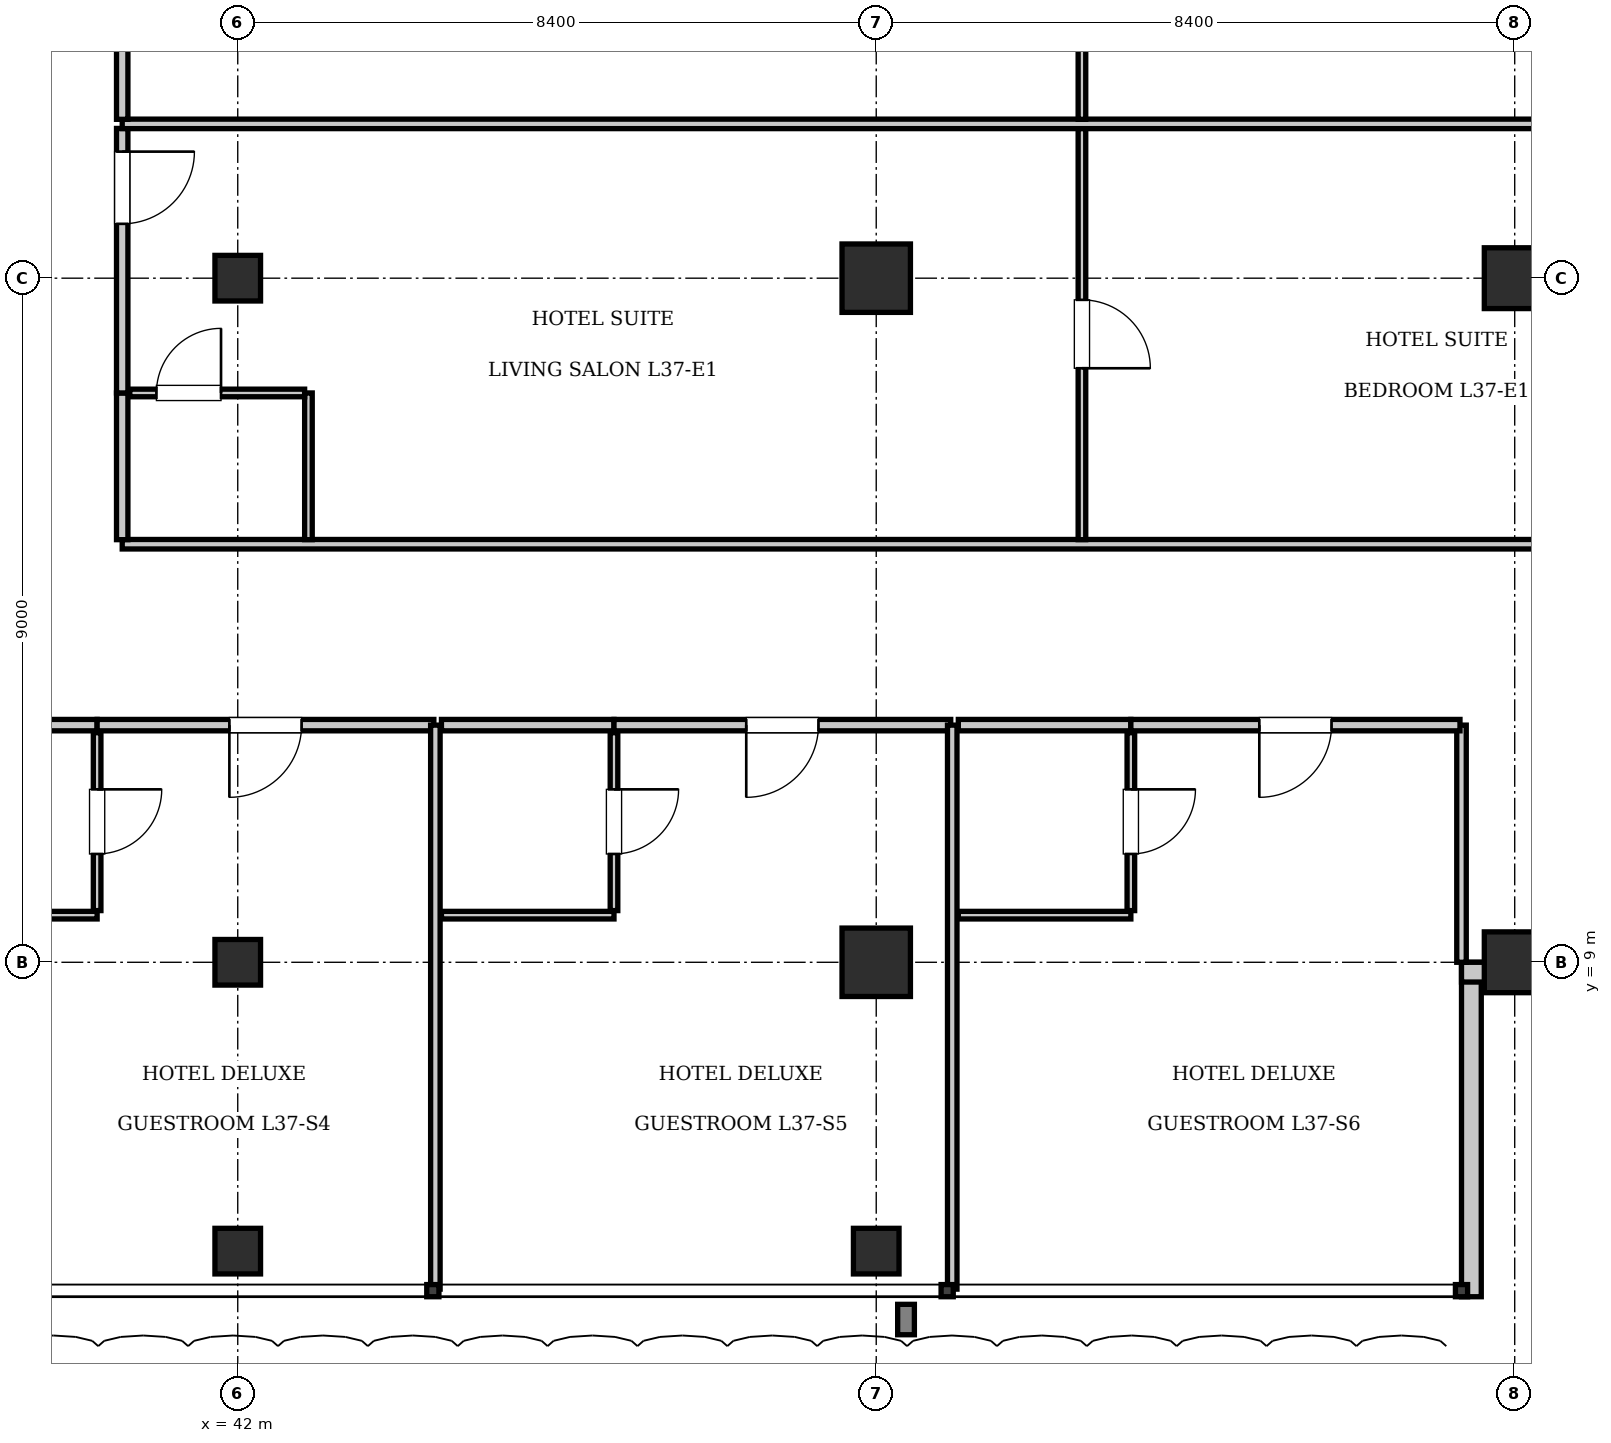
"""IFC4 building model, lengths in metres.
Left out: names, types, materials, properties, quantities, classifications, styles, units other than length and angle.
Written with IfcOpenShell. Run it as: python <this file> out.ifc"""

import sys

from ifc_helpers import new_model, si_unit, direction, frame, frame_2d, origin, origin_2d, place, context, subcontext, project, spatial, rectangle, i_section, extrude, element, fill, save


model = new_model("IFC4")
c1 = context("Model", 3, precision=1e-05, world=origin(), true_north=direction((0.0, 1.0)))
c2 = subcontext(c1, "Body", "Model", "MODEL_VIEW")
j1 = project(units=[si_unit("LENGTHUNIT", "METRE"), si_unit("PLANEANGLEUNIT", "RADIAN")], contexts=[c1])
p1 = place(None, origin())
s1 = spatial("IfcSite", under=j1, at=p1, CompositionType="ELEMENT")
p2 = place(p1, origin())
s2 = spatial("IfcBuilding", under=s1, at=p2, CompositionType="ELEMENT")
p3 = place(p2, frame((0.0, 0.0, 154.35)))
s3 = spatial("IfcBuildingStorey", under=s2, at=p3, CompositionType="ELEMENT", Elevation=154.35)
for number, where, z_axis, x_axis in (
    (1, (50.4, 18.0, 0.0), (0.0, 0.0, 1.0), (1.0, 0.0, 0.0)),
    (2, (50.4, 9.0, 0.0), (0.0, 0.0, 1.0), (1.0, 0.0, 0.0)),
):
    element("IfcColumn", number, at=place(p3, frame(where, z_axis=z_axis, x_axis=x_axis)), inside=s3, PredefinedType="COLUMN", context=c2, shape_type="SweptSolid", body=[
        extrude(rectangle(XDim=0.9, YDim=0.9, at=origin_2d()), origin(), (0.0, 0.0, 1.0), 3.85),
    ])
for number, where, z_axis, x_axis in (
    (3, (42.0, 9.0, 0.0), (0.0, 0.0, 1.0), (1.0, 0.0, 0.0)),
    (4, (42.0, 18.0, 0.0), (0.0, 0.0, 1.0), (1.0, 0.0, 0.0)),
):
    element("IfcColumn", number, at=place(p3, frame(where, z_axis=z_axis, x_axis=x_axis)), inside=s3, PredefinedType="COLUMN", context=c2, shape_type="SweptSolid", body=[
        extrude(i_section(OverallWidth=0.6, OverallDepth=0.6, WebThickness=0.025, FlangeThickness=0.038, at=origin_2d()), origin(), (0.0, 0.0, 1.0), 3.85),
    ])
for number, where, z_axis, x_axis in (
    (5, (58.8, 9.0, 0.0), (0.0, 0.0, 1.0), (1.0, 0.0, 0.0)),
    (6, (58.8, 18.0, 0.0), (0.0, 0.0, 1.0), (1.0, 0.0, 0.0)),
):
    element("IfcColumn", number, at=place(p3, frame(where, z_axis=z_axis, x_axis=x_axis)), inside=s3, PredefinedType="COLUMN", context=c2, shape_type="SweptSolid", body=[
        extrude(rectangle(XDim=0.8, YDim=0.8, at=origin_2d()), origin(), (0.0, 0.0, 1.0), 3.85),
    ])
for number, where, z_axis, x_axis in (
    (7, (42.0, 5.2, 0.0), (0.0, 0.0, 1.0), (1.0, 0.0, 0.0)),
    (8, (50.4, 5.2, 0.0), (0.0, 0.0, 1.0), (1.0, 0.0, 0.0)),
):
    element("IfcColumn", number, at=place(p3, frame(where, z_axis=z_axis, x_axis=x_axis)), inside=s3, PredefinedType="COLUMN", context=c2, shape_type="SweptSolid", body=[
        extrude(i_section(OverallWidth=0.6, OverallDepth=0.6, WebThickness=0.025, FlangeThickness=0.038, at=origin_2d()), origin(), (0.0, 0.0, 1.0), 3.85),
    ])
p4 = place(p3, frame((58.23, 9.0, 0.0), z_axis=(0.0, 0.0, 1.0), x_axis=(0.0, -1.0, 0.0)))
e9 = element("IfcWall", 9, at=p4, inside=s3, PredefinedType="SOLIDWALL", context=c2, shape_type="SweptSolid", body=[
    extrude(rectangle(XDim=4.4, YDim=0.26, at=frame_2d((2.2, 0.0))), origin(), (0.0, 0.0, 1.0), 3.61),
])
p5 = place(p3, frame((62.5, 8.87, 0.0), z_axis=(0.0, 0.0, 1.0), x_axis=(-1.0, 0.0, 0.0)))
e10 = element("IfcWall", 10, at=p5, inside=s3, PredefinedType="SOLIDWALL", context=c2, shape_type="SweptSolid", body=[
    extrude(rectangle(XDim=4.4, YDim=0.26, at=frame_2d((2.2, 0.0))), origin(), (0.0, 0.0, 1.0), 3.007),
])
p6 = place(p3, frame((58.1, 9.0, 0.0), z_axis=(0.0, 0.0, 1.0), x_axis=(0.0, 1.0, 0.0)))
e11 = element("IfcWall", 11, at=p6, inside=s3, PredefinedType="PARTITIONING", context=c2, shape_type="SweptSolid", body=[
    extrude(rectangle(XDim=3.12, YDim=0.125, at=frame_2d((1.56, 0.0))), origin(), (0.0, 0.0, 1.0), 3.61),
])
p7 = place(p3, frame((37.88, 12.12, 0.0), z_axis=(0.0, 0.0, 1.0), x_axis=(1.0, 0.0, 0.0)))
e12 = element("IfcWall", 12, at=p7, inside=s3, PredefinedType="PARTITIONING", context=c2, shape_type="SweptSolid", body=[
    extrude(rectangle(XDim=2.27, YDim=0.15, at=frame_2d((1.135, 0.0))), origin(), (0.0, 0.0, 1.0), 3.61),
])
p8 = place(p3, frame((37.88, 9.62, 0.0), z_axis=(0.0, 0.0, 1.0), x_axis=(1.0, 0.0, 0.0)))
e13 = element("IfcWall", 13, at=p8, inside=s3, PredefinedType="PARTITIONING", context=c2, shape_type="SweptSolid", body=[
    extrude(rectangle(XDim=2.27, YDim=0.1, at=frame_2d((1.135, 0.0))), origin(), (0.0, 0.0, 1.0), 3.61),
])
p9 = place(p3, frame((40.15, 9.68, 0.0), z_axis=(0.0, 0.0, 1.0), x_axis=(0.0, 1.0, 0.0)))
e14 = element("IfcWall", 14, at=p9, inside=s3, PredefinedType="PARTITIONING", context=c2, shape_type="SweptSolid", body=[
    extrude(rectangle(XDim=2.34, YDim=0.1, at=frame_2d((1.17, 0.0))), origin(), (0.0, 0.0, 1.0), 3.61),
])
p10 = place(p9, frame((0.745, 0.0, 0.0)))
e15 = element("IfcOpeningElement", 15, at=p10, cuts=e14, PredefinedType="OPENING", context=c2, shape_type="SweptSolid", body=[
    extrude(rectangle(XDim=0.85, YDim=2.1, at=frame_2d((0.425, 1.05))), frame((0.0, 0.06, 0.0), z_axis=(0.0, -1.0, 0.0), x_axis=(1.0, 0.0, 0.0)), (0.0, 0.0, 1.0), 0.12),
])
p11 = place(p3, frame((40.15, 12.12, 0.0), z_axis=(0.0, 0.0, 1.0), x_axis=(1.0, 0.0, 0.0)))
e16 = element("IfcWall", 16, at=p11, inside=s3, PredefinedType="PARTITIONING", context=c2, shape_type="SweptSolid", body=[
    extrude(rectangle(XDim=4.43, YDim=0.15, at=frame_2d((2.215, 0.0))), origin(), (0.0, 0.0, 1.0), 3.61),
])
p12 = place(p11, frame((1.74, 0.0, 0.0)))
e17 = element("IfcOpeningElement", 17, at=p12, cuts=e16, PredefinedType="OPENING", context=c2, shape_type="SweptSolid", body=[
    extrude(rectangle(XDim=0.95, YDim=2.15, at=frame_2d((0.475, 1.075))), frame((0.0, 0.085, 0.0), z_axis=(0.0, -1.0, 0.0), x_axis=(1.0, 0.0, 0.0)), (0.0, 0.0, 1.0), 0.17),
])
p13 = place(p3, frame((44.6, 4.7, 0.0), z_axis=(0.0, 0.0, 1.0), x_axis=(0.0, 1.0, 0.0)))
e18 = element("IfcWall", 18, at=p13, inside=s3, PredefinedType="PARTITIONING", context=c2, shape_type="SweptSolid", body=[
    extrude(rectangle(XDim=7.42, YDim=0.125, at=frame_2d((3.71, 0.0))), origin(), (0.0, 0.0, 1.0), 3.61),
])
p14 = place(p3, frame((44.68, 12.12, 0.0), z_axis=(0.0, 0.0, 1.0), x_axis=(1.0, 0.0, 0.0)))
e19 = element("IfcWall", 19, at=p14, inside=s3, PredefinedType="PARTITIONING", context=c2, shape_type="SweptSolid", body=[
    extrude(rectangle(XDim=2.27, YDim=0.15, at=frame_2d((1.135, 0.0))), origin(), (0.0, 0.0, 1.0), 3.61),
])
p15 = place(p3, frame((44.68, 9.62, 0.0), z_axis=(0.0, 0.0, 1.0), x_axis=(1.0, 0.0, 0.0)))
e20 = element("IfcWall", 20, at=p15, inside=s3, PredefinedType="PARTITIONING", context=c2, shape_type="SweptSolid", body=[
    extrude(rectangle(XDim=2.27, YDim=0.1, at=frame_2d((1.135, 0.0))), origin(), (0.0, 0.0, 1.0), 3.61),
])
p16 = place(p3, frame((46.95, 9.68, 0.0), z_axis=(0.0, 0.0, 1.0), x_axis=(0.0, 1.0, 0.0)))
e21 = element("IfcWall", 21, at=p16, inside=s3, PredefinedType="PARTITIONING", context=c2, shape_type="SweptSolid", body=[
    extrude(rectangle(XDim=2.34, YDim=0.1, at=frame_2d((1.17, 0.0))), origin(), (0.0, 0.0, 1.0), 3.61),
])
p17 = place(p16, frame((0.745, 0.0, 0.0)))
e22 = element("IfcOpeningElement", 22, at=p17, cuts=e21, PredefinedType="OPENING", context=c2, shape_type="SweptSolid", body=[
    extrude(rectangle(XDim=0.85, YDim=2.1, at=frame_2d((0.425, 1.05))), frame((0.0, 0.06, 0.0), z_axis=(0.0, -1.0, 0.0), x_axis=(1.0, 0.0, 0.0)), (0.0, 0.0, 1.0), 0.12),
])
p18 = place(p3, frame((46.95, 12.12, 0.0), z_axis=(0.0, 0.0, 1.0), x_axis=(1.0, 0.0, 0.0)))
e23 = element("IfcWall", 23, at=p18, inside=s3, PredefinedType="PARTITIONING", context=c2, shape_type="SweptSolid", body=[
    extrude(rectangle(XDim=4.43, YDim=0.15, at=frame_2d((2.215, 0.0))), origin(), (0.0, 0.0, 1.0), 3.61),
])
p19 = place(p18, frame((1.74, 0.0, 0.0)))
e24 = element("IfcOpeningElement", 24, at=p19, cuts=e23, PredefinedType="OPENING", context=c2, shape_type="SweptSolid", body=[
    extrude(rectangle(XDim=0.95, YDim=2.15, at=frame_2d((0.475, 1.075))), frame((0.0, 0.085, 0.0), z_axis=(0.0, -1.0, 0.0), x_axis=(1.0, 0.0, 0.0)), (0.0, 0.0, 1.0), 0.17),
])
p20 = place(p3, frame((51.4, 4.7, 0.0), z_axis=(0.0, 0.0, 1.0), x_axis=(0.0, 1.0, 0.0)))
e25 = element("IfcWall", 25, at=p20, inside=s3, PredefinedType="PARTITIONING", context=c2, shape_type="SweptSolid", body=[
    extrude(rectangle(XDim=7.42, YDim=0.125, at=frame_2d((3.71, 0.0))), origin(), (0.0, 0.0, 1.0), 3.61),
])
p21 = place(p3, frame((51.48, 12.12, 0.0), z_axis=(0.0, 0.0, 1.0), x_axis=(1.0, 0.0, 0.0)))
e26 = element("IfcWall", 26, at=p21, inside=s3, PredefinedType="PARTITIONING", context=c2, shape_type="SweptSolid", body=[
    extrude(rectangle(XDim=2.27, YDim=0.15, at=frame_2d((1.135, 0.0))), origin(), (0.0, 0.0, 1.0), 3.61),
])
p22 = place(p3, frame((51.48, 9.62, 0.0), z_axis=(0.0, 0.0, 1.0), x_axis=(1.0, 0.0, 0.0)))
e27 = element("IfcWall", 27, at=p22, inside=s3, PredefinedType="PARTITIONING", context=c2, shape_type="SweptSolid", body=[
    extrude(rectangle(XDim=2.27, YDim=0.1, at=frame_2d((1.135, 0.0))), origin(), (0.0, 0.0, 1.0), 3.61),
])
p23 = place(p3, frame((53.75, 9.68, 0.0), z_axis=(0.0, 0.0, 1.0), x_axis=(0.0, 1.0, 0.0)))
e28 = element("IfcWall", 28, at=p23, inside=s3, PredefinedType="PARTITIONING", context=c2, shape_type="SweptSolid", body=[
    extrude(rectangle(XDim=2.34, YDim=0.1, at=frame_2d((1.17, 0.0))), origin(), (0.0, 0.0, 1.0), 3.61),
])
p24 = place(p23, frame((0.745, 0.0, 0.0)))
e29 = element("IfcOpeningElement", 29, at=p24, cuts=e28, PredefinedType="OPENING", context=c2, shape_type="SweptSolid", body=[
    extrude(rectangle(XDim=0.85, YDim=2.1, at=frame_2d((0.425, 1.05))), frame((0.0, 0.06, 0.0), z_axis=(0.0, -1.0, 0.0), x_axis=(1.0, 0.0, 0.0)), (0.0, 0.0, 1.0), 0.12),
])
p25 = place(p3, frame((53.75, 12.12, 0.0), z_axis=(0.0, 0.0, 1.0), x_axis=(1.0, 0.0, 0.0)))
e30 = element("IfcWall", 30, at=p25, inside=s3, PredefinedType="PARTITIONING", context=c2, shape_type="SweptSolid", body=[
    extrude(rectangle(XDim=4.33, YDim=0.15, at=frame_2d((2.165, 0.0))), origin(), (0.0, 0.0, 1.0), 3.61),
])
p26 = place(p25, frame((1.69, 0.0, 0.0)))
e31 = element("IfcOpeningElement", 31, at=p26, cuts=e30, PredefinedType="OPENING", context=c2, shape_type="SweptSolid", body=[
    extrude(rectangle(XDim=0.95, YDim=2.15, at=frame_2d((0.475, 1.075))), frame((0.0, 0.085, 0.0), z_axis=(0.0, -1.0, 0.0), x_axis=(1.0, 0.0, 0.0)), (0.0, 0.0, 1.0), 0.17),
])
p27 = place(p3, frame((40.48, 14.5, 0.0), z_axis=(0.0, 0.0, 1.0), x_axis=(1.0, 0.0, 0.0)))
e32 = element("IfcWall", 32, at=p27, inside=s3, PredefinedType="PARTITIONING", context=c2, shape_type="SweptSolid", body=[
    extrude(rectangle(XDim=21.92, YDim=0.125, at=frame_2d((10.96, 0.0))), origin(), (0.0, 0.0, 1.0), 3.61),
])
p28 = place(p3, frame((40.48, 14.56, 0.0), z_axis=(0.0, 0.0, 1.0), x_axis=(0.0, 1.0, 0.0)))
e33 = element("IfcWall", 33, at=p28, inside=s3, PredefinedType="PARTITIONING", context=c2, shape_type="SweptSolid", body=[
    extrude(rectangle(XDim=1.93, YDim=0.15, at=frame_2d((0.965, 0.0))), origin(), (0.0, 0.0, 1.0), 3.61),
])
p29 = place(p3, frame((40.48, 16.49, 0.0), z_axis=(0.0, 0.0, 1.0), x_axis=(0.0, 1.0, 0.0)))
e34 = element("IfcWall", 34, at=p29, inside=s3, PredefinedType="PARTITIONING", context=c2, shape_type="SweptSolid", body=[
    extrude(rectangle(XDim=3.48, YDim=0.15, at=frame_2d((1.74, 0.0))), origin(), (0.0, 0.0, 1.0), 3.61),
])
p30 = place(p29, frame((2.225, 0.0, 0.0)))
e35 = element("IfcOpeningElement", 35, at=p30, cuts=e34, PredefinedType="OPENING", context=c2, shape_type="SweptSolid", body=[
    extrude(rectangle(XDim=0.95, YDim=2.15, at=frame_2d((0.475, 1.075))), frame((0.0, 0.085, 0.0), z_axis=(0.0, -1.0, 0.0), x_axis=(1.0, 0.0, 0.0)), (0.0, 0.0, 1.0), 0.17),
])
p31 = place(p3, frame((42.93, 14.56, 0.0), z_axis=(0.0, 0.0, 1.0), x_axis=(0.0, 1.0, 0.0)))
e36 = element("IfcWall", 36, at=p31, inside=s3, PredefinedType="PARTITIONING", context=c2, shape_type="SweptSolid", body=[
    extrude(rectangle(XDim=1.93, YDim=0.1, at=frame_2d((0.965, 0.0))), origin(), (0.0, 0.0, 1.0), 3.61),
])
p32 = place(p3, frame((40.58, 16.49, 0.0), z_axis=(0.0, 0.0, 1.0), x_axis=(1.0, 0.0, 0.0)))
e37 = element("IfcWall", 37, at=p32, inside=s3, PredefinedType="PARTITIONING", context=c2, shape_type="SweptSolid", body=[
    extrude(rectangle(XDim=2.3, YDim=0.1, at=frame_2d((1.15, 0.0))), origin(), (0.0, 0.0, 1.0), 3.61),
])
p33 = place(p32, frame((0.35, 0.0, 0.0)))
e38 = element("IfcOpeningElement", 38, at=p33, cuts=e37, PredefinedType="OPENING", context=c2, shape_type="SweptSolid", body=[
    extrude(rectangle(XDim=0.85, YDim=2.1, at=frame_2d((0.425, 1.05))), frame((0.0, 0.06, 0.0), z_axis=(0.0, -1.0, 0.0), x_axis=(1.0, 0.0, 0.0)), (0.0, 0.0, 1.0), 0.12),
])
p34 = place(p3, frame((53.106, 14.56, 0.0), z_axis=(0.0, 0.0, 1.0), x_axis=(0.0, 1.0, 0.0)))
e39 = element("IfcWall", 39, at=p34, inside=s3, PredefinedType="PARTITIONING", context=c2, shape_type="SweptSolid", body=[
    extrude(rectangle(XDim=5.41, YDim=0.1, at=frame_2d((2.705, 0.0))), origin(), (0.0, 0.0, 1.0), 3.61),
])
p35 = place(p34, frame((2.255, 0.0, 0.0)))
e40 = element("IfcOpeningElement", 40, at=p35, cuts=e39, PredefinedType="OPENING", context=c2, shape_type="SweptSolid", body=[
    extrude(rectangle(XDim=0.9, YDim=2.1, at=frame_2d((0.45, 1.05))), frame((0.0, 0.06, 0.0), z_axis=(0.0, -1.0, 0.0), x_axis=(1.0, 0.0, 0.0)), (0.0, 0.0, 1.0), 0.12),
])
p36 = place(p3, frame((40.48, 20.03, 0.0), z_axis=(0.0, 0.0, 1.0), x_axis=(1.0, 0.0, 0.0)))
e41 = element("IfcWall", 41, at=p36, inside=s3, PredefinedType="PARTITIONING", context=c2, shape_type="SweptSolid", body=[
    extrude(rectangle(XDim=21.92, YDim=0.125, at=frame_2d((10.96, 0.0))), origin(), (0.0, 0.0, 1.0), 3.61),
])
p37 = place(p3, frame((40.48, 20.09, 0.0), z_axis=(0.0, 0.0, 1.0), x_axis=(0.0, 1.0, 0.0)))
e42 = element("IfcWall", 42, at=p37, inside=s3, PredefinedType="PARTITIONING", context=c2, shape_type="SweptSolid", body=[
    extrude(rectangle(XDim=3.49, YDim=0.15, at=frame_2d((1.745, 0.0))), origin(), (0.0, 0.0, 1.0), 3.61),
])
p38 = place(p37, frame((1.27, 0.0, 0.0)))
e43 = element("IfcOpeningElement", 43, at=p38, cuts=e42, PredefinedType="OPENING", context=c2, shape_type="SweptSolid", body=[
    extrude(rectangle(XDim=0.95, YDim=2.15, at=frame_2d((0.475, 1.075))), frame((0.0, 0.085, 0.0), z_axis=(0.0, -1.0, 0.0), x_axis=(1.0, 0.0, 0.0)), (0.0, 0.0, 1.0), 0.17),
])
p39 = place(p3, frame((53.106, 20.09, 0.0), z_axis=(0.0, 0.0, 1.0), x_axis=(0.0, 1.0, 0.0)))
e44 = element("IfcWall", 44, at=p39, inside=s3, PredefinedType="PARTITIONING", context=c2, shape_type="SweptSolid", body=[
    extrude(rectangle(XDim=5.42, YDim=0.1, at=frame_2d((2.71, 0.0))), origin(), (0.0, 0.0, 1.0), 3.61),
])
p40 = place(p39, frame((2.26, 0.0, 0.0)))
e45 = element("IfcOpeningElement", 45, at=p40, cuts=e44, PredefinedType="OPENING", context=c2, shape_type="SweptSolid", body=[
    extrude(rectangle(XDim=0.9, YDim=2.1, at=frame_2d((0.45, 1.05))), frame((0.0, 0.06, 0.0), z_axis=(0.0, -1.0, 0.0), x_axis=(1.0, 0.0, 0.0)), (0.0, 0.0, 1.0), 0.12),
])
p41 = place(p10, frame((0.85, 0.0, 0.0), z_axis=(0.0, 0.0, 1.0), x_axis=(-1.0, 0.0, 0.0)))
e46 = element("IfcDoor", 46, at=p41, inside=s3, OperationType="SINGLE_SWING_LEFT", PredefinedType="DOOR", context=c2, shape_type="SweptSolid", body=[
    extrude(rectangle(XDim=0.85, YDim=2.1, at=frame_2d((0.425, 1.05))), frame((0.0, 0.025, 0.0), z_axis=(0.0, -1.0, 0.0), x_axis=(1.0, 0.0, 0.0)), (0.0, 0.0, 1.0), 0.05),
])
fill(e15, e46)
p42 = place(p12, frame((0.95, 0.0, 0.0), z_axis=(0.0, 0.0, 1.0), x_axis=(-1.0, 0.0, 0.0)))
e47 = element("IfcDoor", 47, at=p42, inside=s3, OperationType="SINGLE_SWING_RIGHT", PredefinedType="DOOR", context=c2, shape_type="SweptSolid", body=[
    extrude(rectangle(XDim=0.95, YDim=2.15, at=frame_2d((0.475, 1.075))), frame((0.0, 0.025, 0.0), z_axis=(0.0, -1.0, 0.0), x_axis=(1.0, 0.0, 0.0)), (0.0, 0.0, 1.0), 0.05),
])
fill(e17, e47)
p43 = place(p17, frame((0.85, 0.0, 0.0), z_axis=(0.0, 0.0, 1.0), x_axis=(-1.0, 0.0, 0.0)))
e48 = element("IfcDoor", 48, at=p43, inside=s3, OperationType="SINGLE_SWING_LEFT", PredefinedType="DOOR", context=c2, shape_type="SweptSolid", body=[
    extrude(rectangle(XDim=0.85, YDim=2.1, at=frame_2d((0.425, 1.05))), frame((0.0, 0.025, 0.0), z_axis=(0.0, -1.0, 0.0), x_axis=(1.0, 0.0, 0.0)), (0.0, 0.0, 1.0), 0.05),
])
fill(e22, e48)
p44 = place(p19, frame((0.95, 0.0, 0.0), z_axis=(0.0, 0.0, 1.0), x_axis=(-1.0, 0.0, 0.0)))
e49 = element("IfcDoor", 49, at=p44, inside=s3, OperationType="SINGLE_SWING_RIGHT", PredefinedType="DOOR", context=c2, shape_type="SweptSolid", body=[
    extrude(rectangle(XDim=0.95, YDim=2.15, at=frame_2d((0.475, 1.075))), frame((0.0, 0.025, 0.0), z_axis=(0.0, -1.0, 0.0), x_axis=(1.0, 0.0, 0.0)), (0.0, 0.0, 1.0), 0.05),
])
fill(e24, e49)
p45 = place(p24, frame((0.85, 0.0, 0.0), z_axis=(0.0, 0.0, 1.0), x_axis=(-1.0, 0.0, 0.0)))
e50 = element("IfcDoor", 50, at=p45, inside=s3, OperationType="SINGLE_SWING_LEFT", PredefinedType="DOOR", context=c2, shape_type="SweptSolid", body=[
    extrude(rectangle(XDim=0.85, YDim=2.1, at=frame_2d((0.425, 1.05))), frame((0.0, 0.025, 0.0), z_axis=(0.0, -1.0, 0.0), x_axis=(1.0, 0.0, 0.0)), (0.0, 0.0, 1.0), 0.05),
])
fill(e29, e50)
p46 = place(p26, frame((0.95, 0.0, 0.0), z_axis=(0.0, 0.0, 1.0), x_axis=(-1.0, 0.0, 0.0)))
e51 = element("IfcDoor", 51, at=p46, inside=s3, OperationType="SINGLE_SWING_RIGHT", PredefinedType="DOOR", context=c2, shape_type="SweptSolid", body=[
    extrude(rectangle(XDim=0.95, YDim=2.15, at=frame_2d((0.475, 1.075))), frame((0.0, 0.025, 0.0), z_axis=(0.0, -1.0, 0.0), x_axis=(1.0, 0.0, 0.0)), (0.0, 0.0, 1.0), 0.05),
])
fill(e31, e51)
p47 = place(p33, origin())
e52 = element("IfcDoor", 52, at=p47, inside=s3, OperationType="SINGLE_SWING_RIGHT", PredefinedType="DOOR", context=c2, shape_type="SweptSolid", body=[
    extrude(rectangle(XDim=0.85, YDim=2.1, at=frame_2d((0.425, 1.05))), frame((0.0, 0.025, 0.0), z_axis=(0.0, -1.0, 0.0), x_axis=(1.0, 0.0, 0.0)), (0.0, 0.0, 1.0), 0.05),
])
fill(e38, e52)
p48 = place(p30, frame((0.95, 0.0, 0.0), z_axis=(0.0, 0.0, 1.0), x_axis=(-1.0, 0.0, 0.0)))
e53 = element("IfcDoor", 53, at=p48, inside=s3, OperationType="SINGLE_SWING_LEFT", PredefinedType="DOOR", context=c2, shape_type="SweptSolid", body=[
    extrude(rectangle(XDim=0.95, YDim=2.15, at=frame_2d((0.475, 1.075))), frame((0.0, 0.025, 0.0), z_axis=(0.0, -1.0, 0.0), x_axis=(1.0, 0.0, 0.0)), (0.0, 0.0, 1.0), 0.05),
])
fill(e35, e53)
p49 = place(p35, frame((0.9, 0.0, 0.0), z_axis=(0.0, 0.0, 1.0), x_axis=(-1.0, 0.0, 0.0)))
e54 = element("IfcDoor", 54, at=p49, inside=s3, OperationType="SINGLE_SWING_RIGHT", PredefinedType="DOOR", context=c2, shape_type="SweptSolid", body=[
    extrude(rectangle(XDim=0.9, YDim=2.1, at=frame_2d((0.45, 1.05))), frame((0.0, 0.025, 0.0), z_axis=(0.0, -1.0, 0.0), x_axis=(1.0, 0.0, 0.0)), (0.0, 0.0, 1.0), 0.05),
])
fill(e40, e54)
save(model, sys.argv[1])
